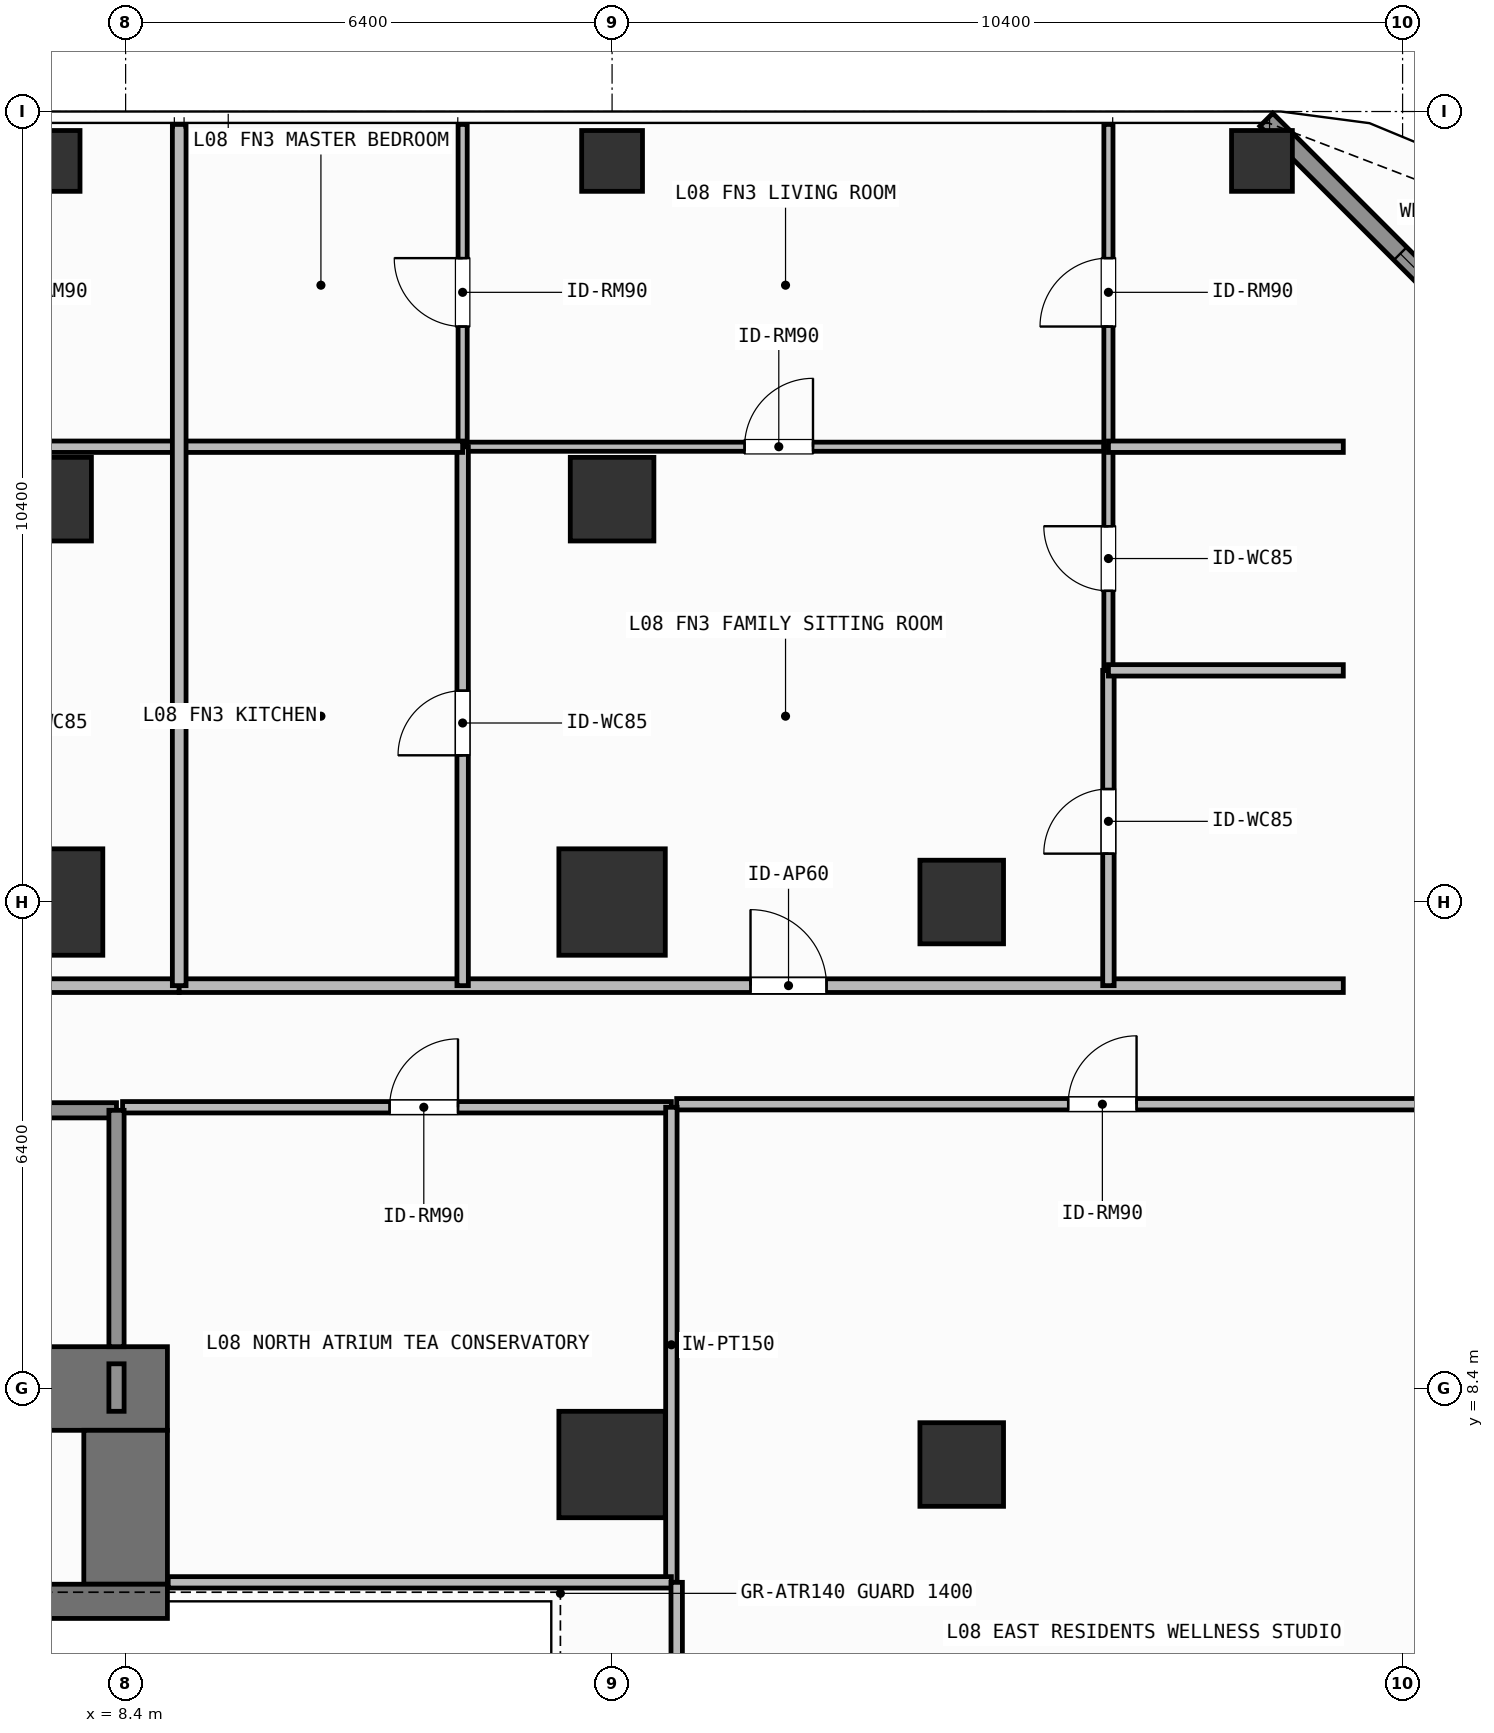
"""IFC4 building model, lengths in metres.
Left out: names, types, materials, properties, quantities, classifications, styles, units other than length and angle.
Written with IfcOpenShell. Run it as: python <this file> out.ifc"""

import sys

from ifc_helpers import new_model, si_unit, direction, frame, frame_2d, origin, origin_2d, place, context, subcontext, project, spatial, rectangle, hollow_rectangle, extrude, element, fill, save


model = new_model("IFC4")
c1 = context("Model", 3, precision=1e-05, world=origin(), true_north=direction((0.0, 1.0)))
c2 = subcontext(c1, "Body", "Model", "MODEL_VIEW")
j1 = project(units=[si_unit("LENGTHUNIT", "METRE"), si_unit("PLANEANGLEUNIT", "RADIAN")], contexts=[c1])
p1 = place(None, origin())
s1 = spatial("IfcSite", under=j1, at=p1, CompositionType="ELEMENT")
p2 = place(p1, origin())
s2 = spatial("IfcBuilding", under=s1, at=p2, CompositionType="ELEMENT")
p3 = place(p2, frame((0.0, 0.0, 30.6)))
s3 = spatial("IfcBuildingStorey", under=s2, at=p3, CompositionType="ELEMENT", Elevation=30.6)
p4 = place(p3, frame((-7.55, 8.4, 0.0), z_axis=(0.0, 0.0, 1.0), x_axis=(1.0, 0.0, 0.0)))
e1 = element("IfcWall", 1, at=p4, inside=s3, PredefinedType="SHEAR", context=c2, shape_type="SweptSolid", body=[
    extrude(rectangle(XDim=16.5, YDim=1.1, at=frame_2d((8.25, 0.0))), origin(), (0.0, 0.0, 1.0), 3.9),
])
p5 = place(p3, frame((8.4, 5.825, 0.0), z_axis=(0.0, 0.0, 1.0), x_axis=(0.0, 1.0, 0.0)))
e2 = element("IfcWall", 2, at=p5, inside=s3, PredefinedType="SHEAR", context=c2, shape_type="SweptSolid", body=[
    extrude(rectangle(XDim=2.025, YDim=1.1, at=frame_2d((1.013, 0.0))), origin(), (0.0, 0.0, 1.0), 3.9),
])
p6 = place(p3, frame((3.045, 5.6, 0.0), z_axis=(0.0, 0.0, 1.0), x_axis=(1.0, 0.0, 0.0)))
e3 = element("IfcWall", 3, at=p6, inside=s3, PredefinedType="SHEAR", context=c2, shape_type="SweptSolid", body=[
    extrude(rectangle(XDim=5.905, YDim=0.45, at=frame_2d((2.953, 0.0))), origin(), (0.0, 0.0, 1.0), 3.9),
])
for number, where, z_axis, x_axis in (
    (4, (7.4, 14.8, 0.0), (0.0, 0.0, 1.0), (1.0, 0.0, 0.0)),
    (5, (14.8, 14.8, 0.0), (0.0, 0.0, 1.0), (1.0, 0.0, 0.0)),
    (6, (14.8, 7.4, 0.0), (0.0, 0.0, 1.0), (1.0, 0.0, 0.0)),
):
    element("IfcColumn", number, at=place(p3, frame(where, z_axis=z_axis, x_axis=x_axis)), inside=s3, PredefinedType="COLUMN", context=c2, shape_type="SweptSolid", body=[
        extrude(rectangle(XDim=1.4, YDim=1.4, at=origin_2d()), origin(), (0.0, 0.0, 1.0), 3.9),
    ])
for number, where, z_axis, x_axis in (
    (7, (19.4, 7.4, 0.0), (0.0, 0.0, 1.0), (1.0, 0.0, 0.0)),
    (8, (19.4, 14.8, 0.0), (0.0, 0.0, 1.0), (1.0, 0.0, 0.0)),
    (9, (7.4, 20.1, 0.0), (0.0, 0.0, 1.0), (1.0, 0.0, 0.0)),
    (10, (14.8, 20.1, 0.0), (0.0, 0.0, 1.0), (1.0, 0.0, 0.0)),
):
    element("IfcColumn", number, at=place(p3, frame(where, z_axis=z_axis, x_axis=x_axis)), inside=s3, PredefinedType="COLUMN", context=c2, shape_type="SweptSolid", body=[
        extrude(rectangle(XDim=1.1, YDim=1.1, at=origin_2d()), origin(), (0.0, 0.0, 1.0), 3.9),
    ])
for number, where, z_axis, x_axis in (
    (11, (23.35, 24.55, 0.0), (0.0, 0.0, 1.0), (1.0, 0.0, 0.0)),
    (12, (7.4, 24.55, 0.0), (0.0, 0.0, 1.0), (1.0, 0.0, 0.0)),
    (13, (14.8, 24.55, 0.0), (0.0, 0.0, 1.0), (1.0, 0.0, 0.0)),
):
    element("IfcColumn", number, at=place(p3, frame(where, z_axis=z_axis, x_axis=x_axis)), inside=s3, PredefinedType="COLUMN", context=c2, shape_type="SweptSolid", body=[
        extrude(hollow_rectangle(XDim=0.8, YDim=0.8, WallThickness=0.036, at=origin_2d()), origin(), (0.0, 0.0, 1.0), 3.9),
    ])
p7 = place(p3, frame((23.408, 25.092, 0.0), z_axis=(0.0, 0.0, 1.0), x_axis=(0.707106781187, -0.707106781187, 0.0)))
e14 = element("IfcWall", 14, at=p7, inside=s3, PredefinedType="SOLIDWALL", context=c2, shape_type="SweptSolid", body=[
    extrude(rectangle(XDim=6.484, YDim=0.24, at=frame_2d((3.242, 0.0))), origin(), (0.0, 0.0, 1.0), 3.68),
])
p8 = place(p7, frame((2.492, 0.0, 0.8)))
e15 = element("IfcOpeningElement", 15, at=p8, cuts=e14, PredefinedType="OPENING", context=c2, shape_type="SweptSolid", body=[
    extrude(rectangle(XDim=1.5, YDim=1.85, at=frame_2d((0.75, 0.925))), frame((0.0, 0.13, 0.0), z_axis=(0.0, -1.0, 0.0), x_axis=(1.0, 0.0, 0.0)), (0.0, 0.0, 1.0), 0.26),
])
p9 = place(p3, frame((4.58, 12.06, 0.0), z_axis=(0.0, 0.0, 1.0), x_axis=(1.0, 0.0, 0.0)))
e16 = element("IfcWall", 16, at=p9, inside=s3, PredefinedType="SOLIDWALL", context=c2, shape_type="SweptSolid", body=[
    extrude(rectangle(XDim=3.7, YDim=0.2, at=frame_2d((1.85, 0.0))), origin(), (0.0, 0.0, 1.0), 3.68),
])
p10 = place(p9, frame((1.212, 0.0, 0.0)))
e17 = element("IfcOpeningElement", 17, at=p10, cuts=e16, PredefinedType="OPENING", context=c2, shape_type="SweptSolid", body=[
    extrude(rectangle(XDim=1.1, YDim=2.15, at=frame_2d((0.55, 1.075))), frame((0.0, 0.11, 0.0), z_axis=(0.0, -1.0, 0.0), x_axis=(1.0, 0.0, 0.0)), (0.0, 0.0, 1.0), 0.22),
])
p11 = place(p3, frame((8.36, 12.1, 0.0), z_axis=(0.0, 0.0, 1.0), x_axis=(1.0, 0.0, 0.0)))
e18 = element("IfcWall", 18, at=p11, inside=s3, PredefinedType="PARTITIONING", context=c2, shape_type="SweptSolid", body=[
    extrude(rectangle(XDim=7.22, YDim=0.15, at=frame_2d((3.61, 0.0))), origin(), (0.0, 0.0, 1.0), 3.68),
])
p12 = place(p11, frame((3.513, 0.0, 0.0)))
e19 = element("IfcOpeningElement", 19, at=p12, cuts=e18, PredefinedType="OPENING", context=c2, shape_type="SweptSolid", body=[
    extrude(rectangle(XDim=0.9, YDim=2.1, at=frame_2d((0.45, 1.05))), frame((0.0, 0.085, 0.0), z_axis=(0.0, -1.0, 0.0), x_axis=(1.0, 0.0, 0.0)), (0.0, 0.0, 1.0), 0.17),
])
p13 = place(p3, frame((-2.121, 13.7, 0.0), z_axis=(0.0, 0.0, 1.0), x_axis=(1.0, 0.0, 0.0)))
e20 = element("IfcWall", 20, at=p13, inside=s3, PredefinedType="PARTITIONING", context=c2, shape_type="SweptSolid", body=[
    extrude(rectangle(XDim=11.226, YDim=0.18, at=frame_2d((5.613, 0.0))), origin(), (0.0, 0.0, 1.0), 3.68),
])
p14 = place(p13, frame((5.29, 0.0, 0.0)))
e21 = element("IfcOpeningElement", 21, at=p14, cuts=e20, PredefinedType="OPENING", context=c2, shape_type="SweptSolid", body=[
    extrude(rectangle(XDim=1.0, YDim=2.2, at=frame_2d((0.5, 1.1))), frame((0.0, 0.1, 0.0), z_axis=(0.0, -1.0, 0.0), x_axis=(1.0, 0.0, 0.0)), (0.0, 0.0, 1.0), 0.2),
])
p15 = place(p3, frame((9.105, 13.7, 0.0), z_axis=(0.0, 0.0, 1.0), x_axis=(1.0, 0.0, 0.0)))
e22 = element("IfcWall", 22, at=p15, inside=s3, PredefinedType="PARTITIONING", context=c2, shape_type="SweptSolid", body=[
    extrude(rectangle(XDim=15.315, YDim=0.18, at=frame_2d((7.657, 0.0))), origin(), (0.0, 0.0, 1.0), 3.68),
])
p16 = place(p15, frame((7.516, 0.0, 0.0)))
e23 = element("IfcOpeningElement", 23, at=p16, cuts=e22, PredefinedType="OPENING", context=c2, shape_type="SweptSolid", body=[
    extrude(rectangle(XDim=1.0, YDim=2.2, at=frame_2d((0.5, 1.1))), frame((0.0, 0.1, 0.0), z_axis=(0.0, -1.0, 0.0), x_axis=(1.0, 0.0, 0.0)), (0.0, 0.0, 1.0), 0.2),
])
p17 = place(p3, frame((12.834, 20.79, 0.0), z_axis=(0.0, 0.0, 1.0), x_axis=(1.0, 0.0, 0.0)))
e24 = element("IfcWall", 24, at=p17, inside=s3, PredefinedType="PARTITIONING", context=c2, shape_type="SweptSolid", body=[
    extrude(rectangle(XDim=8.496, YDim=0.12, at=frame_2d((4.248, 0.0))), origin(), (0.0, 0.0, 1.0), 3.68),
])
p18 = place(p17, frame((3.709, 0.0, 0.0)))
e25 = element("IfcOpeningElement", 25, at=p18, cuts=e24, PredefinedType="OPENING", context=c2, shape_type="SweptSolid", body=[
    extrude(rectangle(XDim=0.9, YDim=2.1, at=frame_2d((0.45, 1.05))), frame((0.0, 0.07, 0.0), z_axis=(0.0, -1.0, 0.0), x_axis=(1.0, 0.0, 0.0)), (0.0, 0.0, 1.0), 0.14),
])
p19 = place(p3, frame((12.834, 13.7, 0.0), z_axis=(0.0, 0.0, 1.0), x_axis=(0.0, 1.0, 0.0)))
e26 = element("IfcWall", 26, at=p19, inside=s3, PredefinedType="PARTITIONING", context=c2, shape_type="SweptSolid", body=[
    extrude(rectangle(XDim=7.09, YDim=0.15, at=frame_2d((3.545, 0.0))), origin(), (0.0, 0.0, 1.0), 3.68),
])
p20 = place(p19, frame((3.03, 0.0, 0.0)))
e27 = element("IfcOpeningElement", 27, at=p20, cuts=e26, PredefinedType="OPENING", context=c2, shape_type="SweptSolid", body=[
    extrude(rectangle(XDim=0.85, YDim=2.1, at=frame_2d((0.425, 1.05))), frame((0.0, 0.085, 0.0), z_axis=(0.0, -1.0, 0.0), x_axis=(1.0, 0.0, 0.0)), (0.0, 0.0, 1.0), 0.17),
])
p21 = place(p3, frame((12.834, 20.79, 0.0), z_axis=(0.0, 0.0, 1.0), x_axis=(0.0, 1.0, 0.0)))
e28 = element("IfcWall", 28, at=p21, inside=s3, PredefinedType="PARTITIONING", context=c2, shape_type="SweptSolid", body=[
    extrude(rectangle(XDim=4.24, YDim=0.12, at=frame_2d((2.12, 0.0))), origin(), (0.0, 0.0, 1.0), 3.68),
])
p22 = place(p21, frame((1.581, 0.0, 0.0)))
e29 = element("IfcOpeningElement", 29, at=p22, cuts=e28, PredefinedType="OPENING", context=c2, shape_type="SweptSolid", body=[
    extrude(rectangle(XDim=0.9, YDim=2.1, at=frame_2d((0.45, 1.05))), frame((0.0, 0.07, 0.0), z_axis=(0.0, -1.0, 0.0), x_axis=(1.0, 0.0, 0.0)), (0.0, 0.0, 1.0), 0.14),
])
p23 = place(p3, frame((21.33, 13.7, 0.0), z_axis=(0.0, 0.0, 1.0), x_axis=(0.0, 1.0, 0.0)))
e30 = element("IfcWall", 30, at=p23, inside=s3, PredefinedType="PARTITIONING", context=c2, shape_type="SweptSolid", body=[
    extrude(rectangle(XDim=4.148, YDim=0.15, at=frame_2d((2.074, 0.0))), origin(), (0.0, 0.0, 1.0), 3.68),
])
p24 = place(p23, frame((1.737, 0.0, 0.0)))
e31 = element("IfcOpeningElement", 31, at=p24, cuts=e30, PredefinedType="OPENING", context=c2, shape_type="SweptSolid", body=[
    extrude(rectangle(XDim=0.85, YDim=2.1, at=frame_2d((0.425, 1.05))), frame((0.0, 0.085, 0.0), z_axis=(0.0, -1.0, 0.0), x_axis=(1.0, 0.0, 0.0)), (0.0, 0.0, 1.0), 0.17),
])
p25 = place(p3, frame((21.33, 17.848, 0.0), z_axis=(0.0, 0.0, 1.0), x_axis=(0.0, 1.0, 0.0)))
e32 = element("IfcWall", 32, at=p25, inside=s3, PredefinedType="PARTITIONING", context=c2, shape_type="SweptSolid", body=[
    extrude(rectangle(XDim=2.942, YDim=0.12, at=frame_2d((1.471, 0.0))), origin(), (0.0, 0.0, 1.0), 3.68),
])
p26 = place(p25, frame((1.046, 0.0, 0.0)))
e33 = element("IfcOpeningElement", 33, at=p26, cuts=e32, PredefinedType="OPENING", context=c2, shape_type="SweptSolid", body=[
    extrude(rectangle(XDim=0.85, YDim=2.1, at=frame_2d((0.425, 1.05))), frame((0.0, 0.07, 0.0), z_axis=(0.0, -1.0, 0.0), x_axis=(1.0, 0.0, 0.0)), (0.0, 0.0, 1.0), 0.14),
])
p27 = place(p3, frame((21.33, 20.79, 0.0), z_axis=(0.0, 0.0, 1.0), x_axis=(0.0, 1.0, 0.0)))
e34 = element("IfcWall", 34, at=p27, inside=s3, PredefinedType="PARTITIONING", context=c2, shape_type="SweptSolid", body=[
    extrude(rectangle(XDim=4.24, YDim=0.12, at=frame_2d((2.12, 0.0))), origin(), (0.0, 0.0, 1.0), 3.68),
])
p28 = place(p27, frame((1.581, 0.0, 0.0)))
e35 = element("IfcOpeningElement", 35, at=p28, cuts=e34, PredefinedType="OPENING", context=c2, shape_type="SweptSolid", body=[
    extrude(rectangle(XDim=0.9, YDim=2.1, at=frame_2d((0.45, 1.05))), frame((0.0, 0.07, 0.0), z_axis=(0.0, -1.0, 0.0), x_axis=(1.0, 0.0, 0.0)), (0.0, 0.0, 1.0), 0.14),
])
p29 = place(p3, frame((15.65, 12.14, 0.0), z_axis=(0.0, 0.0, 1.0), x_axis=(1.0, 0.0, 0.0)))
e36 = element("IfcWall", 36, at=p29, inside=s3, PredefinedType="PARTITIONING", context=c2, shape_type="SweptSolid", body=[
    extrude(rectangle(XDim=12.27, YDim=0.15, at=frame_2d((6.135, 0.0))), origin(), (0.0, 0.0, 1.0), 3.68),
])
p30 = place(p29, frame((5.15, 0.0, 0.0)))
e37 = element("IfcOpeningElement", 37, at=p30, cuts=e36, PredefinedType="OPENING", context=c2, shape_type="SweptSolid", body=[
    extrude(rectangle(XDim=0.9, YDim=2.1, at=frame_2d((0.45, 1.05))), frame((0.0, 0.085, 0.0), z_axis=(0.0, -1.0, 0.0), x_axis=(1.0, 0.0, 0.0)), (0.0, 0.0, 1.0), 0.17),
])
p31 = place(p3, frame((8.28, 8.95, 0.0), z_axis=(0.0, 0.0, 1.0), x_axis=(0.0, 1.0, 0.0)))
e38 = element("IfcWall", 38, at=p31, inside=s3, PredefinedType="SOLIDWALL", context=c2, shape_type="SweptSolid", body=[
    extrude(rectangle(XDim=3.11, YDim=0.2, at=frame_2d((1.555, 0.0))), origin(), (0.0, 0.0, 1.0), 3.68),
])
p32 = place(p3, frame((8.28, 8.1, 0.0), z_axis=(0.0, 0.0, 1.0), x_axis=(0.0, 1.0, 0.0)))
e39 = element("IfcWall", 39, at=p32, inside=s3, PredefinedType="SOLIDWALL", context=c2, shape_type="SweptSolid", body=[
    extrude(rectangle(XDim=0.625, YDim=0.2, at=frame_2d((0.312, 0.0))), origin(), (0.0, 0.0, 1.0), 3.68),
])
p33 = place(p3, frame((15.58, 5.85, 0.0), z_axis=(0.0, 0.0, 1.0), x_axis=(0.0, 1.0, 0.0)))
e40 = element("IfcWall", 40, at=p33, inside=s3, PredefinedType="PARTITIONING", context=c2, shape_type="SweptSolid", body=[
    extrude(rectangle(XDim=6.25, YDim=0.15, at=frame_2d((3.125, 0.0))), origin(), (0.0, 0.0, 1.0), 3.68),
])
p34 = place(p3, frame((8.96, 5.85, 0.0), z_axis=(0.0, 0.0, 1.0), x_axis=(1.0, 0.0, 0.0)))
e41 = element("IfcWall", 41, at=p34, inside=s3, PredefinedType="PARTITIONING", context=c2, shape_type="SweptSolid", body=[
    extrude(rectangle(XDim=6.62, YDim=0.15, at=frame_2d((3.31, 0.0))), origin(), (0.0, 0.0, 1.0), 3.68),
])
p35 = place(p3, frame((5.466, 20.79, 0.0), z_axis=(0.0, 0.0, 1.0), x_axis=(1.0, 0.0, 0.0)))
e42 = element("IfcWall", 42, at=p35, inside=s3, PredefinedType="PARTITIONING", context=c2, shape_type="SweptSolid", body=[
    extrude(rectangle(XDim=3.639, YDim=0.15, at=frame_2d((1.819, 0.0))), origin(), (0.0, 0.0, 1.0), 3.68),
])
p36 = place(p3, frame((9.105, 20.79, 0.0), z_axis=(0.0, 0.0, 1.0), x_axis=(1.0, 0.0, 0.0)))
e43 = element("IfcWall", 43, at=p36, inside=s3, PredefinedType="PARTITIONING", context=c2, shape_type="SweptSolid", body=[
    extrude(rectangle(XDim=3.729, YDim=0.15, at=frame_2d((1.865, 0.0))), origin(), (0.0, 0.0, 1.0), 3.68),
])
for number, where, z_axis, x_axis in (
    (44, (21.33, 17.848, 0.0), (0.0, 0.0, 1.0), (1.0, 0.0, 0.0)),
    (45, (21.33, 20.79, 0.0), (0.0, 0.0, 1.0), (1.0, 0.0, 0.0)),
):
    element("IfcWall", number, at=place(p3, frame(where, z_axis=z_axis, x_axis=x_axis)), inside=s3, PredefinedType="PARTITIONING", context=c2, shape_type="SweptSolid", body=[
        extrude(rectangle(XDim=3.09, YDim=0.15, at=frame_2d((1.545, 0.0))), origin(), (0.0, 0.0, 1.0), 3.68),
    ])
p37 = place(p3, frame((9.105, 13.7, 0.0), z_axis=(0.0, 0.0, 1.0), x_axis=(0.0, 1.0, 0.0)))
e46 = element("IfcWall", 46, at=p37, inside=s3, PredefinedType="PARTITIONING", context=c2, shape_type="SweptSolid", body=[
    extrude(rectangle(XDim=11.33, YDim=0.18, at=frame_2d((5.665, 0.0))), origin(), (0.0, 0.0, 1.0), 3.68),
])
p38 = place(p3, frame((15.65, -1.8, 0.0), z_axis=(0.0, 0.0, 1.0), x_axis=(0.0, 1.0, 0.0)))
e47 = element("IfcWall", 47, at=p38, inside=s3, PredefinedType="PARTITIONING", context=c2, shape_type="SweptSolid", body=[
    extrude(rectangle(XDim=7.65, YDim=0.15, at=frame_2d((3.825, 0.0))), origin(), (0.0, 0.0, 1.0), 3.68),
])
p39 = place(p8, origin())
e48 = element("IfcWindow", 48, at=p39, inside=s3, PartitioningType="SINGLE_PANEL", PredefinedType="WINDOW", context=c2, shape_type="SweptSolid", body=[
    extrude(rectangle(XDim=1.5, YDim=1.85, at=frame_2d((0.75, 0.925))), frame((0.0, 0.03, 0.0), z_axis=(0.0, -1.0, 0.0), x_axis=(1.0, 0.0, 0.0)), (0.0, 0.0, 1.0), 0.06),
])
fill(e15, e48)
p40 = place(p12, origin())
e49 = element("IfcDoor", 49, at=p40, inside=s3, OperationType="SINGLE_SWING_RIGHT", PredefinedType="DOOR", context=c2, shape_type="SweptSolid", body=[
    extrude(rectangle(XDim=0.9, YDim=2.1, at=frame_2d((0.45, 1.05))), frame((0.0, 0.025, 0.0), z_axis=(0.0, -1.0, 0.0), x_axis=(1.0, 0.0, 0.0)), (0.0, 0.0, 1.0), 0.05),
])
fill(e19, e49)
p41 = place(p16, origin())
e50 = element("IfcDoor", 50, at=p41, inside=s3, OperationType="SINGLE_SWING_LEFT", PredefinedType="DOOR", context=c2, shape_type="SweptSolid", body=[
    extrude(rectangle(XDim=1.0, YDim=2.2, at=frame_2d((0.5, 1.1))), frame((0.0, 0.025, 0.0), z_axis=(0.0, -1.0, 0.0), x_axis=(1.0, 0.0, 0.0)), (0.0, 0.0, 1.0), 0.05),
])
fill(e23, e50)
p42 = place(p18, origin())
e51 = element("IfcDoor", 51, at=p42, inside=s3, OperationType="SINGLE_SWING_RIGHT", PredefinedType="DOOR", context=c2, shape_type="SweptSolid", body=[
    extrude(rectangle(XDim=0.9, YDim=2.1, at=frame_2d((0.45, 1.05))), frame((0.0, 0.025, 0.0), z_axis=(0.0, -1.0, 0.0), x_axis=(1.0, 0.0, 0.0)), (0.0, 0.0, 1.0), 0.05),
])
fill(e25, e51)
p43 = place(p20, origin())
e52 = element("IfcDoor", 52, at=p43, inside=s3, OperationType="SINGLE_SWING_LEFT", PredefinedType="DOOR", context=c2, shape_type="SweptSolid", body=[
    extrude(rectangle(XDim=0.85, YDim=2.1, at=frame_2d((0.425, 1.05))), frame((0.0, 0.025, 0.0), z_axis=(0.0, -1.0, 0.0), x_axis=(1.0, 0.0, 0.0)), (0.0, 0.0, 1.0), 0.05),
])
fill(e27, e52)
p44 = place(p22, origin())
e53 = element("IfcDoor", 53, at=p44, inside=s3, OperationType="SINGLE_SWING_RIGHT", PredefinedType="DOOR", context=c2, shape_type="SweptSolid", body=[
    extrude(rectangle(XDim=0.9, YDim=2.1, at=frame_2d((0.45, 1.05))), frame((0.0, 0.025, 0.0), z_axis=(0.0, -1.0, 0.0), x_axis=(1.0, 0.0, 0.0)), (0.0, 0.0, 1.0), 0.05),
])
fill(e29, e53)
p45 = place(p24, origin())
e54 = element("IfcDoor", 54, at=p45, inside=s3, OperationType="SINGLE_SWING_LEFT", PredefinedType="DOOR", context=c2, shape_type="SweptSolid", body=[
    extrude(rectangle(XDim=0.85, YDim=2.1, at=frame_2d((0.425, 1.05))), frame((0.0, 0.025, 0.0), z_axis=(0.0, -1.0, 0.0), x_axis=(1.0, 0.0, 0.0)), (0.0, 0.0, 1.0), 0.05),
])
fill(e31, e54)
p46 = place(p26, origin())
e55 = element("IfcDoor", 55, at=p46, inside=s3, OperationType="SINGLE_SWING_RIGHT", PredefinedType="DOOR", context=c2, shape_type="SweptSolid", body=[
    extrude(rectangle(XDim=0.85, YDim=2.1, at=frame_2d((0.425, 1.05))), frame((0.0, 0.025, 0.0), z_axis=(0.0, -1.0, 0.0), x_axis=(1.0, 0.0, 0.0)), (0.0, 0.0, 1.0), 0.05),
])
fill(e33, e55)
p47 = place(p28, origin())
e56 = element("IfcDoor", 56, at=p47, inside=s3, OperationType="SINGLE_SWING_LEFT", PredefinedType="DOOR", context=c2, shape_type="SweptSolid", body=[
    extrude(rectangle(XDim=0.9, YDim=2.1, at=frame_2d((0.45, 1.05))), frame((0.0, 0.025, 0.0), z_axis=(0.0, -1.0, 0.0), x_axis=(1.0, 0.0, 0.0)), (0.0, 0.0, 1.0), 0.05),
])
fill(e35, e56)
p48 = place(p30, origin())
e57 = element("IfcDoor", 57, at=p48, inside=s3, OperationType="SINGLE_SWING_RIGHT", PredefinedType="DOOR", context=c2, shape_type="SweptSolid", body=[
    extrude(rectangle(XDim=0.9, YDim=2.1, at=frame_2d((0.45, 1.05))), frame((0.0, 0.025, 0.0), z_axis=(0.0, -1.0, 0.0), x_axis=(1.0, 0.0, 0.0)), (0.0, 0.0, 1.0), 0.05),
])
fill(e37, e57)
save(model, sys.argv[1])
